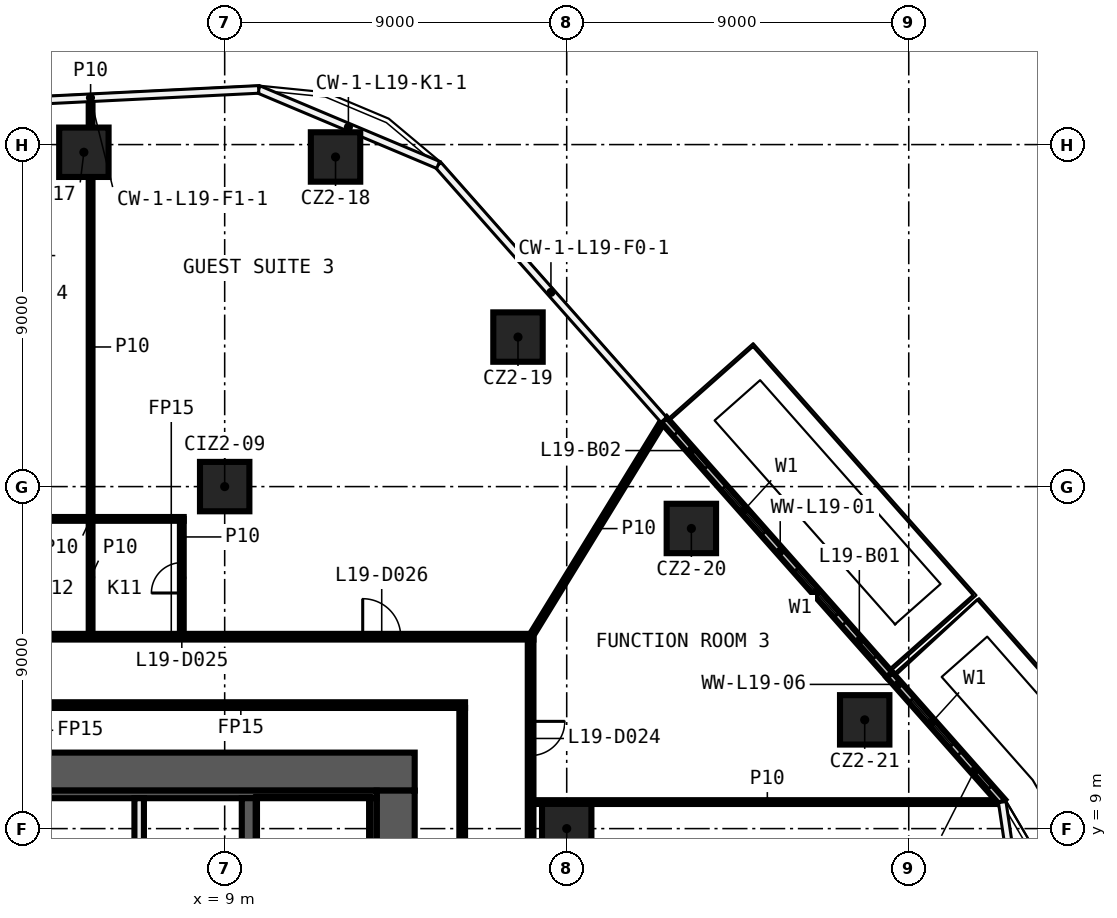
"""IFC4 building model, lengths in metres.
Left out: names, types, materials, properties, quantities, classifications, styles, units other than length and angle.
Written with IfcOpenShell. Run it as: python <this file> out.ifc"""

import sys

from ifc_helpers import new_model, si_unit, direction, frame, frame_2d, origin, origin_2d, place, context, subcontext, project, spatial, rectangle, extrude, element, fill, save


model = new_model("IFC4")
c1 = context("Model", 3, precision=1e-05, world=origin(), true_north=direction((0.0, 1.0)))
c2 = subcontext(c1, "Body", "Model", "MODEL_VIEW")
j1 = project(units=[si_unit("LENGTHUNIT", "METRE"), si_unit("PLANEANGLEUNIT", "RADIAN")], contexts=[c1])
p1 = place(None, origin())
s1 = spatial("IfcSite", under=j1, at=p1, CompositionType="ELEMENT")
p2 = place(p1, origin())
s2 = spatial("IfcBuilding", under=s1, at=p2, CompositionType="ELEMENT")
p3 = place(p2, frame((0.0, 0.0, 95.2)))
s3 = spatial("IfcBuildingStorey", under=s2, at=p3, CompositionType="ELEMENT", Elevation=95.2)
for number, where, z_axis, x_axis in (
    (1, (5.295, 26.798, 0.0), (0.0, 0.0, 1.0), (1.0, 0.0, 0.0)),
    (2, (11.917, 26.674, 0.0), (0.0, 0.0, 1.0), (1.0, 0.0, 0.0)),
    (3, (16.718, 21.935, 0.0), (0.0, 0.0, 1.0), (1.0, 0.0, 0.0)),
    (4, (21.28, 16.898, 0.0), (0.0, 0.0, 1.0), (1.0, 0.0, 0.0)),
    (5, (25.841, 11.862, 0.0), (0.0, 0.0, 1.0), (1.0, 0.0, 0.0)),
    (6, (9.0, 18.0, 0.0), (0.0, 0.0, 1.0), (1.0, 0.0, 0.0)),
    (7, (18.0, 9.0, 0.0), (0.0, 0.0, 1.0), (1.0, 0.0, 0.0)),
):
    element("IfcColumn", number, at=place(p3, frame(where, z_axis=z_axis, x_axis=x_axis)), inside=s3, PredefinedType="COLUMN", context=c2, shape_type="SweptSolid", body=[
        extrude(rectangle(XDim=1.3, YDim=1.3, at=origin_2d()), origin(), (0.0, 0.0, 1.0), 3.25),
    ])
p4 = place(p3, frame((17.125, 9.698, 0.0), z_axis=(0.0, 0.0, 1.0), x_axis=(1.0, 0.0, 0.0)))
e8 = element("IfcWall", 8, at=p4, inside=s3, PredefinedType="PARTITIONING", context=c2, shape_type="SweptSolid", body=[
    extrude(rectangle(XDim=12.308, YDim=0.1, at=frame_2d((6.154, 0.0))), origin(), (0.0, 0.0, 1.0), 3.25),
])
p5 = place(p3, frame((3.525, 12.25, 0.0), z_axis=(0.0, 0.0, 1.0), x_axis=(1.0, 0.0, 0.0)))
e9 = element("IfcWall", 9, at=p5, inside=s3, PredefinedType="PARTITIONING", context=c2, shape_type="SweptSolid", body=[
    extrude(rectangle(XDim=11.8, YDim=0.15, at=frame_2d((5.9, 0.0))), origin(), (0.0, 0.0, 1.0), 3.25),
])
p6 = place(p3, frame((-17.125, 14.05, 0.0), z_axis=(0.0, 0.0, 1.0), x_axis=(1.0, 0.0, 0.0)))
e10 = element("IfcWall", 10, at=p6, inside=s3, PredefinedType="PARTITIONING", context=c2, shape_type="SweptSolid", body=[
    extrude(rectangle(XDim=34.25, YDim=0.15, at=frame_2d((17.125, 0.0))), origin(), (0.0, 0.0, 1.0), 3.25),
])
p7 = place(p6, frame((29.757, 0.0, 0.0)))
e11 = element("IfcOpeningElement", 11, at=p7, cuts=e10, PredefinedType="OPENING", context=c2, shape_type="SweptSolid", body=[
    extrude(rectangle(XDim=1.0, YDim=2.1, at=frame_2d((0.5, 1.05))), frame((0.0, 0.085, 0.0), z_axis=(0.0, -1.0, 0.0), x_axis=(1.0, 0.0, 0.0)), (0.0, 0.0, 1.0), 0.17),
])
p8 = place(p6, frame((18.682, 0.0, 0.0)))
e12 = element("IfcOpeningElement", 12, at=p8, cuts=e10, PredefinedType="OPENING", context=c2, shape_type="SweptSolid", body=[
    extrude(rectangle(XDim=1.0, YDim=2.1, at=frame_2d((0.5, 1.05))), frame((0.0, 0.085, 0.0), z_axis=(0.0, -1.0, 0.0), x_axis=(1.0, 0.0, 0.0)), (0.0, 0.0, 1.0), 0.17),
])
p9 = place(p6, frame((16.654, 0.0, 0.0)))
e13 = element("IfcOpeningElement", 13, at=p9, cuts=e10, PredefinedType="OPENING", context=c2, shape_type="SweptSolid", body=[
    extrude(rectangle(XDim=1.0, YDim=2.1, at=frame_2d((0.5, 1.05))), frame((0.0, 0.085, 0.0), z_axis=(0.0, -1.0, 0.0), x_axis=(1.0, 0.0, 0.0)), (0.0, 0.0, 1.0), 0.17),
])
p10 = place(p6, frame((9.827, 0.0, 0.0)))
e14 = element("IfcOpeningElement", 14, at=p10, cuts=e10, PredefinedType="OPENING", context=c2, shape_type="SweptSolid", body=[
    extrude(rectangle(XDim=1.0, YDim=2.1, at=frame_2d((0.5, 1.05))), frame((0.0, 0.085, 0.0), z_axis=(0.0, -1.0, 0.0), x_axis=(1.0, 0.0, 0.0)), (0.0, 0.0, 1.0), 0.17),
])
p11 = place(p6, frame((7.8, 0.0, 0.0)))
e15 = element("IfcOpeningElement", 15, at=p11, cuts=e10, PredefinedType="OPENING", context=c2, shape_type="SweptSolid", body=[
    extrude(rectangle(XDim=1.0, YDim=2.1, at=frame_2d((0.5, 1.05))), frame((0.0, 0.085, 0.0), z_axis=(0.0, -1.0, 0.0), x_axis=(1.0, 0.0, 0.0)), (0.0, 0.0, 1.0), 0.17),
])
p12 = place(p6, frame((2.56, 0.0, 0.0)))
e16 = element("IfcOpeningElement", 16, at=p12, cuts=e10, PredefinedType="OPENING", context=c2, shape_type="SweptSolid", body=[
    extrude(rectangle(XDim=0.9, YDim=2.1, at=frame_2d((0.45, 1.05))), frame((0.0, 0.085, 0.0), z_axis=(0.0, -1.0, 0.0), x_axis=(1.0, 0.0, 0.0)), (0.0, 0.0, 1.0), 0.17),
])
p13 = place(p3, frame((3.022, 17.15, 0.0), z_axis=(0.0, 0.0, 1.0), x_axis=(1.0, 0.0, 0.0)))
e17 = element("IfcWall", 17, at=p13, inside=s3, PredefinedType="PARTITIONING", context=c2, shape_type="SweptSolid", body=[
    extrude(rectangle(XDim=4.9, YDim=0.1, at=frame_2d((2.45, 0.0))), origin(), (0.0, 0.0, 1.0), 3.25),
])
p14 = place(p3, frame((17.05, 14.05, 0.0), z_axis=(0.0, 0.0, 1.0), x_axis=(0.523105565691, 0.852267896346, 0.0)))
e18 = element("IfcWall", 18, at=p14, inside=s3, PredefinedType="PARTITIONING", context=c2, shape_type="SweptSolid", body=[
    extrude(rectangle(XDim=6.677, YDim=0.1, at=frame_2d((3.338, 0.0))), origin(), (0.0, 0.0, 1.0), 3.25),
])
p15 = place(p3, frame((17.05, 13.975, 0.0), z_axis=(0.0, 0.0, 1.0), x_axis=(0.0, -1.0, 0.0)))
e19 = element("IfcWall", 19, at=p15, inside=s3, PredefinedType="PARTITIONING", context=c2, shape_type="SweptSolid", body=[
    extrude(rectangle(XDim=27.95, YDim=0.15, at=frame_2d((13.975, 0.0))), origin(), (0.0, 0.0, 1.0), 3.25),
])
p16 = place(p15, frame((25.274, 0.0, 0.0)))
e20 = element("IfcOpeningElement", 20, at=p16, cuts=e19, PredefinedType="OPENING", context=c2, shape_type="SweptSolid", body=[
    extrude(rectangle(XDim=0.9, YDim=2.1, at=frame_2d((0.45, 1.05))), frame((0.0, 0.085, 0.0), z_axis=(0.0, -1.0, 0.0), x_axis=(1.0, 0.0, 0.0)), (0.0, 0.0, 1.0), 0.17),
])
p17 = place(p15, frame((18.854, 0.0, 0.0)))
e21 = element("IfcOpeningElement", 21, at=p17, cuts=e19, PredefinedType="OPENING", context=c2, shape_type="SweptSolid", body=[
    extrude(rectangle(XDim=1.0, YDim=2.1, at=frame_2d((0.5, 1.05))), frame((0.0, 0.085, 0.0), z_axis=(0.0, -1.0, 0.0), x_axis=(1.0, 0.0, 0.0)), (0.0, 0.0, 1.0), 0.17),
])
p18 = place(p15, frame((17.299, 0.0, 0.0)))
e22 = element("IfcOpeningElement", 22, at=p18, cuts=e19, PredefinedType="OPENING", context=c2, shape_type="SweptSolid", body=[
    extrude(rectangle(XDim=1.0, YDim=2.1, at=frame_2d((0.5, 1.05))), frame((0.0, 0.085, 0.0), z_axis=(0.0, -1.0, 0.0), x_axis=(1.0, 0.0, 0.0)), (0.0, 0.0, 1.0), 0.17),
])
p19 = place(p15, frame((11.171, 0.0, 0.0)))
e23 = element("IfcOpeningElement", 23, at=p19, cuts=e19, PredefinedType="OPENING", context=c2, shape_type="SweptSolid", body=[
    extrude(rectangle(XDim=0.9, YDim=2.1, at=frame_2d((0.45, 1.05))), frame((0.0, 0.085, 0.0), z_axis=(0.0, -1.0, 0.0), x_axis=(1.0, 0.0, 0.0)), (0.0, 0.0, 1.0), 0.17),
])
p20 = place(p15, frame((7.243, 0.0, 0.0)))
e24 = element("IfcOpeningElement", 24, at=p20, cuts=e19, PredefinedType="OPENING", context=c2, shape_type="SweptSolid", body=[
    extrude(rectangle(XDim=0.9, YDim=2.1, at=frame_2d((0.45, 1.05))), frame((0.0, 0.085, 0.0), z_axis=(0.0, -1.0, 0.0), x_axis=(1.0, 0.0, 0.0)), (0.0, 0.0, 1.0), 0.17),
])
p21 = place(p15, frame((2.153, 0.0, 0.0)))
e25 = element("IfcOpeningElement", 25, at=p21, cuts=e19, PredefinedType="OPENING", context=c2, shape_type="SweptSolid", body=[
    extrude(rectangle(XDim=0.9, YDim=2.1, at=frame_2d((0.45, 1.05))), frame((0.0, 0.085, 0.0), z_axis=(0.0, -1.0, 0.0), x_axis=(1.0, 0.0, 0.0)), (0.0, 0.0, 1.0), 0.17),
])
p22 = place(p3, frame((15.25, -12.175, 0.0), z_axis=(0.0, 0.0, 1.0), x_axis=(0.0, 1.0, 0.0)))
e26 = element("IfcWall", 26, at=p22, inside=s3, PredefinedType="PARTITIONING", context=c2, shape_type="SweptSolid", body=[
    extrude(rectangle(XDim=24.35, YDim=0.15, at=frame_2d((12.175, 0.0))), origin(), (0.0, 0.0, 1.0), 3.25),
])
p23 = place(p22, frame((11.725, 0.0, 0.0)))
e27 = element("IfcOpeningElement", 27, at=p23, cuts=e26, PredefinedType="OPENING", context=c2, shape_type="SweptSolid", body=[
    extrude(rectangle(XDim=0.9, YDim=2.1, at=frame_2d((0.45, 1.05))), frame((0.0, 0.085, 0.0), z_axis=(0.0, -1.0, 0.0), x_axis=(1.0, 0.0, 0.0)), (0.0, 0.0, 1.0), 0.17),
])
p24 = place(p3, frame((7.872, 14.125, 0.0), z_axis=(0.0, 0.0, 1.0), x_axis=(0.0, 1.0, 0.0)))
e28 = element("IfcWall", 28, at=p24, inside=s3, PredefinedType="PARTITIONING", context=c2, shape_type="SweptSolid", body=[
    extrude(rectangle(XDim=3.025, YDim=0.1, at=frame_2d((1.512, 0.0))), origin(), (0.0, 0.0, 1.0), 3.25),
])
p25 = place(p24, frame((1.075, 0.0, 0.0)))
e29 = element("IfcOpeningElement", 29, at=p25, cuts=e28, PredefinedType="OPENING", context=c2, shape_type="SweptSolid", body=[
    extrude(rectangle(XDim=0.8, YDim=2.1, at=frame_2d((0.4, 1.05))), frame((0.0, 0.06, 0.0), z_axis=(0.0, -1.0, 0.0), x_axis=(1.0, 0.0, 0.0)), (0.0, 0.0, 1.0), 0.12),
])
p26 = place(p3, frame((5.472, 14.125, 0.0), z_axis=(0.0, 0.0, 1.0), x_axis=(0.0, 1.0, 0.0)))
e30 = element("IfcWall", 30, at=p26, inside=s3, PredefinedType="PARTITIONING", context=c2, shape_type="SweptSolid", body=[
    extrude(rectangle(XDim=2.975, YDim=0.1, at=frame_2d((1.488, 0.0))), origin(), (0.0, 0.0, 1.0), 3.25),
])
p27 = place(p3, frame((5.472, 17.2, 0.0), z_axis=(0.0, 0.0, 1.0), x_axis=(0.0, 1.0, 0.0)))
e31 = element("IfcWall", 31, at=p27, inside=s3, PredefinedType="PARTITIONING", context=c2, shape_type="SweptSolid", body=[
    extrude(rectangle(XDim=8.948, YDim=0.1, at=frame_2d((4.474, 0.0))), origin(), (0.0, 0.0, 1.0), 3.25),
])
p28 = place(p3, frame((5.472, 27.448, 0.0), z_axis=(0.0, 0.0, 1.0), x_axis=(0.0, 1.0, 0.0)))
e32 = element("IfcWall", 32, at=p28, inside=s3, PredefinedType="PARTITIONING", context=c2, shape_type="SweptSolid", body=[
    extrude(rectangle(XDim=0.764, YDim=0.1, at=frame_2d((0.382, 0.0))), origin(), (0.0, 0.0, 1.0), 3.25),
])
p29 = place(p3, frame((26.495, 13.046, 0.0), z_axis=(0.0, 0.0, 1.0), x_axis=(-0.662851206757, 0.748751145376, 0.0)))
e33 = element("IfcWall", 33, at=p29, inside=s3, PredefinedType="SOLIDWALL", context=c2, shape_type="SweptSolid", body=[
    extrude(rectangle(XDim=8.964, YDim=0.2, at=frame_2d((4.482, 0.0))), origin(), (0.0, 0.0, 1.0), 3.25),
])
p30 = place(p29, frame((2.1, 0.0, 0.6)))
e34 = element("IfcOpeningElement", 34, at=p30, cuts=e33, PredefinedType="OPENING", context=c2, shape_type="SweptSolid", body=[
    extrude(rectangle(XDim=1.6, YDim=2.4, at=frame_2d((0.8, 1.2))), frame((0.0, 0.11, 0.0), z_axis=(0.0, -1.0, 0.0), x_axis=(1.0, 0.0, 0.0)), (0.0, 0.0, 1.0), 0.22),
])
p31 = place(p29, frame((0.6, 0.0, 0.0)))
e35 = element("IfcOpeningElement", 35, at=p31, cuts=e33, PredefinedType="OPENING", context=c2, shape_type="SweptSolid", body=[
    extrude(rectangle(XDim=1.2, YDim=2.4, at=frame_2d((0.6, 1.2))), frame((0.0, 0.11, 0.0), z_axis=(0.0, -1.0, 0.0), x_axis=(1.0, 0.0, 0.0)), (0.0, 0.0, 1.0), 0.22),
])
p32 = place(p29, frame((4.982, 0.0, 0.6)))
e36 = element("IfcOpeningElement", 36, at=p32, cuts=e33, PredefinedType="OPENING", context=c2, shape_type="SweptSolid", body=[
    extrude(rectangle(XDim=1.6, YDim=2.4, at=frame_2d((0.8, 1.2))), frame((0.0, 0.11, 0.0), z_axis=(0.0, -1.0, 0.0), x_axis=(1.0, 0.0, 0.0)), (0.0, 0.0, 1.0), 0.22),
])
p33 = place(p29, frame((7.282, 0.0, 0.0)))
e37 = element("IfcOpeningElement", 37, at=p33, cuts=e33, PredefinedType="OPENING", context=c2, shape_type="SweptSolid", body=[
    extrude(rectangle(XDim=1.2, YDim=2.4, at=frame_2d((0.6, 1.2))), frame((0.0, 0.11, 0.0), z_axis=(0.0, -1.0, 0.0), x_axis=(1.0, 0.0, 0.0)), (0.0, 0.0, 1.0), 0.22),
])
p34 = place(p3, frame((29.46, 9.698, 0.0), z_axis=(0.0, 0.0, 1.0), x_axis=(-0.662868291848, 0.748736020011, 0.0)))
e38 = element("IfcWall", 38, at=p34, inside=s3, PredefinedType="SOLIDWALL", context=c2, shape_type="SweptSolid", body=[
    extrude(rectangle(XDim=4.472, YDim=0.2, at=frame_2d((2.236, 0.0))), origin(), (0.0, 0.0, 1.0), 3.25),
])
p35 = place(p34, frame((2.0, 0.0, 0.6)))
e39 = element("IfcOpeningElement", 39, at=p35, cuts=e38, PredefinedType="OPENING", context=c2, shape_type="SweptSolid", body=[
    extrude(rectangle(XDim=1.6, YDim=2.4, at=frame_2d((0.8, 1.2))), frame((0.0, 0.11, 0.0), z_axis=(0.0, -1.0, 0.0), x_axis=(1.0, 0.0, 0.0)), (0.0, 0.0, 1.0), 0.22),
])
p36 = place(p34, frame((0.5, 0.0, 0.0)))
e40 = element("IfcOpeningElement", 40, at=p36, cuts=e38, PredefinedType="OPENING", context=c2, shape_type="SweptSolid", body=[
    extrude(rectangle(XDim=1.2, YDim=2.4, at=frame_2d((0.6, 1.2))), frame((0.0, 0.11, 0.0), z_axis=(0.0, -1.0, 0.0), x_axis=(1.0, 0.0, 0.0)), (0.0, 0.0, 1.0), 0.22),
])
p37 = place(p3, frame((-14.0, 10.5, 0.0), z_axis=(0.0, 0.0, 1.0), x_axis=(1.0, 0.0, 0.0)))
e41 = element("IfcWall", 41, at=p37, inside=s3, PredefinedType="SHEAR", context=c2, shape_type="SweptSolid", body=[
    extrude(rectangle(XDim=28.0, YDim=1.0, at=frame_2d((14.0, 0.0))), origin(), (0.0, 0.0, 1.0), 3.25),
])
p38 = place(p37, frame((15.9, 0.0, 0.0)))
e42 = element("IfcOpeningElement", 42, at=p38, cuts=e41, PredefinedType="OPENING", context=c2, shape_type="SweptSolid", body=[
    extrude(rectangle(XDim=1.6, YDim=2.1, at=frame_2d((0.8, 1.05))), frame((0.0, 0.51, 0.0), z_axis=(0.0, -1.0, 0.0), x_axis=(1.0, 0.0, 0.0)), (0.0, 0.0, 1.0), 1.02),
])
p39 = place(p3, frame((13.5, 10.0, 0.0), z_axis=(0.0, 0.0, 1.0), x_axis=(0.0, -1.0, 0.0)))
e43 = element("IfcWall", 43, at=p39, inside=s3, PredefinedType="SHEAR", context=c2, shape_type="SweptSolid", body=[
    extrude(rectangle(XDim=20.0, YDim=1.0, at=frame_2d((10.0, 0.0))), origin(), (0.0, 0.0, 1.0), 3.25),
])
p40 = place(p3, frame((3.9, 9.9, 0.0), z_axis=(0.0, 0.0, 1.0), x_axis=(1.0, 0.0, 0.0)))
e44 = element("IfcWall", 44, at=p40, inside=s3, PredefinedType="SHEAR", context=c2, shape_type="SweptSolid", body=[
    extrude(rectangle(XDim=9.1, YDim=0.2, at=frame_2d((4.55, 0.0))), origin(), (0.0, 0.0, 1.0), 3.25),
])
p41 = place(p3, frame((12.9, 9.8, 0.0), z_axis=(0.0, 0.0, 1.0), x_axis=(0.0, -1.0, 0.0)))
e45 = element("IfcWall", 45, at=p41, inside=s3, PredefinedType="SHEAR", context=c2, shape_type="SweptSolid", body=[
    extrude(rectangle(XDim=19.6, YDim=0.2, at=frame_2d((9.8, 0.0))), origin(), (0.0, 0.0, 1.0), 3.25),
])
p42 = place(p3, frame((9.65, 9.8, 0.0), z_axis=(0.0, 0.0, 1.0), x_axis=(0.0, -1.0, 0.0)))
e46 = element("IfcWall", 46, at=p42, inside=s3, PredefinedType="SHEAR", context=c2, shape_type="SweptSolid", body=[
    extrude(rectangle(XDim=7.5, YDim=0.4, at=frame_2d((3.75, 0.0))), origin(), (0.0, 0.0, 1.0), 3.25),
])
p43 = place(p42, frame((5.1, 0.0, 0.0)))
e47 = element("IfcOpeningElement", 47, at=p43, cuts=e46, PredefinedType="OPENING", context=c2, shape_type="SweptSolid", body=[
    extrude(rectangle(XDim=1.2, YDim=2.1, at=frame_2d((0.6, 1.05))), frame((0.0, 0.21, 0.0), z_axis=(0.0, -1.0, 0.0), x_axis=(1.0, 0.0, 0.0)), (0.0, 0.0, 1.0), 0.42),
])
p44 = place(p3, frame((6.75, 7.075, 0.0), z_axis=(0.0, 0.0, 1.0), x_axis=(0.0, 1.0, 0.0)))
e48 = element("IfcWall", 48, at=p44, inside=s3, PredefinedType="SOLIDWALL", context=c2, shape_type="SweptSolid", body=[
    extrude(rectangle(XDim=2.725, YDim=0.25, at=frame_2d((1.363, 0.0))), origin(), (0.0, 0.0, 1.0), 3.25),
])
p45 = place(p21, origin())
e49 = element("IfcDoor", 49, at=p45, inside=s3, OperationType="SINGLE_SWING_RIGHT", PredefinedType="DOOR", context=c2, shape_type="SweptSolid", body=[
    extrude(rectangle(XDim=0.9, YDim=2.1, at=frame_2d((0.45, 1.05))), frame((0.0, 0.025, 0.0), z_axis=(0.0, -1.0, 0.0), x_axis=(1.0, 0.0, 0.0)), (0.0, 0.0, 1.0), 0.05),
])
fill(e25, e49)
p46 = place(p25, origin())
e50 = element("IfcDoor", 50, at=p46, inside=s3, OperationType="SINGLE_SWING_RIGHT", PredefinedType="DOOR", context=c2, shape_type="SweptSolid", body=[
    extrude(rectangle(XDim=0.8, YDim=2.1, at=frame_2d((0.4, 1.05))), frame((0.0, 0.025, 0.0), z_axis=(0.0, -1.0, 0.0), x_axis=(1.0, 0.0, 0.0)), (0.0, 0.0, 1.0), 0.05),
])
fill(e29, e50)
p47 = place(p7, origin())
e51 = element("IfcDoor", 51, at=p47, inside=s3, OperationType="SINGLE_SWING_LEFT", PredefinedType="DOOR", context=c2, shape_type="SweptSolid", body=[
    extrude(rectangle(XDim=1.0, YDim=2.1, at=frame_2d((0.5, 1.05))), frame((0.0, 0.025, 0.0), z_axis=(0.0, -1.0, 0.0), x_axis=(1.0, 0.0, 0.0)), (0.0, 0.0, 1.0), 0.05),
])
fill(e11, e51)
p48 = place(p30, origin())
e52 = element("IfcWindow", 52, at=p48, inside=s3, PartitioningType="SINGLE_PANEL", PredefinedType="WINDOW", context=c2, shape_type="SweptSolid", body=[
    extrude(rectangle(XDim=1.6, YDim=2.4, at=frame_2d((0.8, 1.2))), frame((0.0, 0.03, 0.0), z_axis=(0.0, -1.0, 0.0), x_axis=(1.0, 0.0, 0.0)), (0.0, 0.0, 1.0), 0.06),
])
fill(e34, e52)
p49 = place(p31, origin())
e53 = element("IfcDoor", 53, at=p49, inside=s3, OperationType="SLIDING_TO_LEFT", PredefinedType="DOOR", context=c2, shape_type="SweptSolid", body=[
    extrude(rectangle(XDim=1.2, YDim=2.4, at=frame_2d((0.6, 1.2))), frame((0.0, 0.025, 0.0), z_axis=(0.0, -1.0, 0.0), x_axis=(1.0, 0.0, 0.0)), (0.0, 0.0, 1.0), 0.05),
])
fill(e35, e53)
p50 = place(p32, origin())
e54 = element("IfcWindow", 54, at=p50, inside=s3, PartitioningType="SINGLE_PANEL", PredefinedType="WINDOW", context=c2, shape_type="SweptSolid", body=[
    extrude(rectangle(XDim=1.6, YDim=2.4, at=frame_2d((0.8, 1.2))), frame((0.0, 0.03, 0.0), z_axis=(0.0, -1.0, 0.0), x_axis=(1.0, 0.0, 0.0)), (0.0, 0.0, 1.0), 0.06),
])
fill(e36, e54)
p51 = place(p33, origin())
e55 = element("IfcDoor", 55, at=p51, inside=s3, OperationType="SLIDING_TO_LEFT", PredefinedType="DOOR", context=c2, shape_type="SweptSolid", body=[
    extrude(rectangle(XDim=1.2, YDim=2.4, at=frame_2d((0.6, 1.2))), frame((0.0, 0.025, 0.0), z_axis=(0.0, -1.0, 0.0), x_axis=(1.0, 0.0, 0.0)), (0.0, 0.0, 1.0), 0.05),
])
fill(e37, e55)
p52 = place(p35, origin())
e56 = element("IfcWindow", 56, at=p52, inside=s3, PartitioningType="SINGLE_PANEL", PredefinedType="WINDOW", context=c2, shape_type="SweptSolid", body=[
    extrude(rectangle(XDim=1.6, YDim=2.4, at=frame_2d((0.8, 1.2))), frame((0.0, 0.03, 0.0), z_axis=(0.0, -1.0, 0.0), x_axis=(1.0, 0.0, 0.0)), (0.0, 0.0, 1.0), 0.06),
])
fill(e39, e56)
p53 = place(p36, origin())
e57 = element("IfcDoor", 57, at=p53, inside=s3, OperationType="SLIDING_TO_LEFT", PredefinedType="DOOR", context=c2, shape_type="SweptSolid", body=[
    extrude(rectangle(XDim=1.2, YDim=2.4, at=frame_2d((0.6, 1.2))), frame((0.0, 0.025, 0.0), z_axis=(0.0, -1.0, 0.0), x_axis=(1.0, 0.0, 0.0)), (0.0, 0.0, 1.0), 0.05),
])
fill(e40, e57)
save(model, sys.argv[1])
